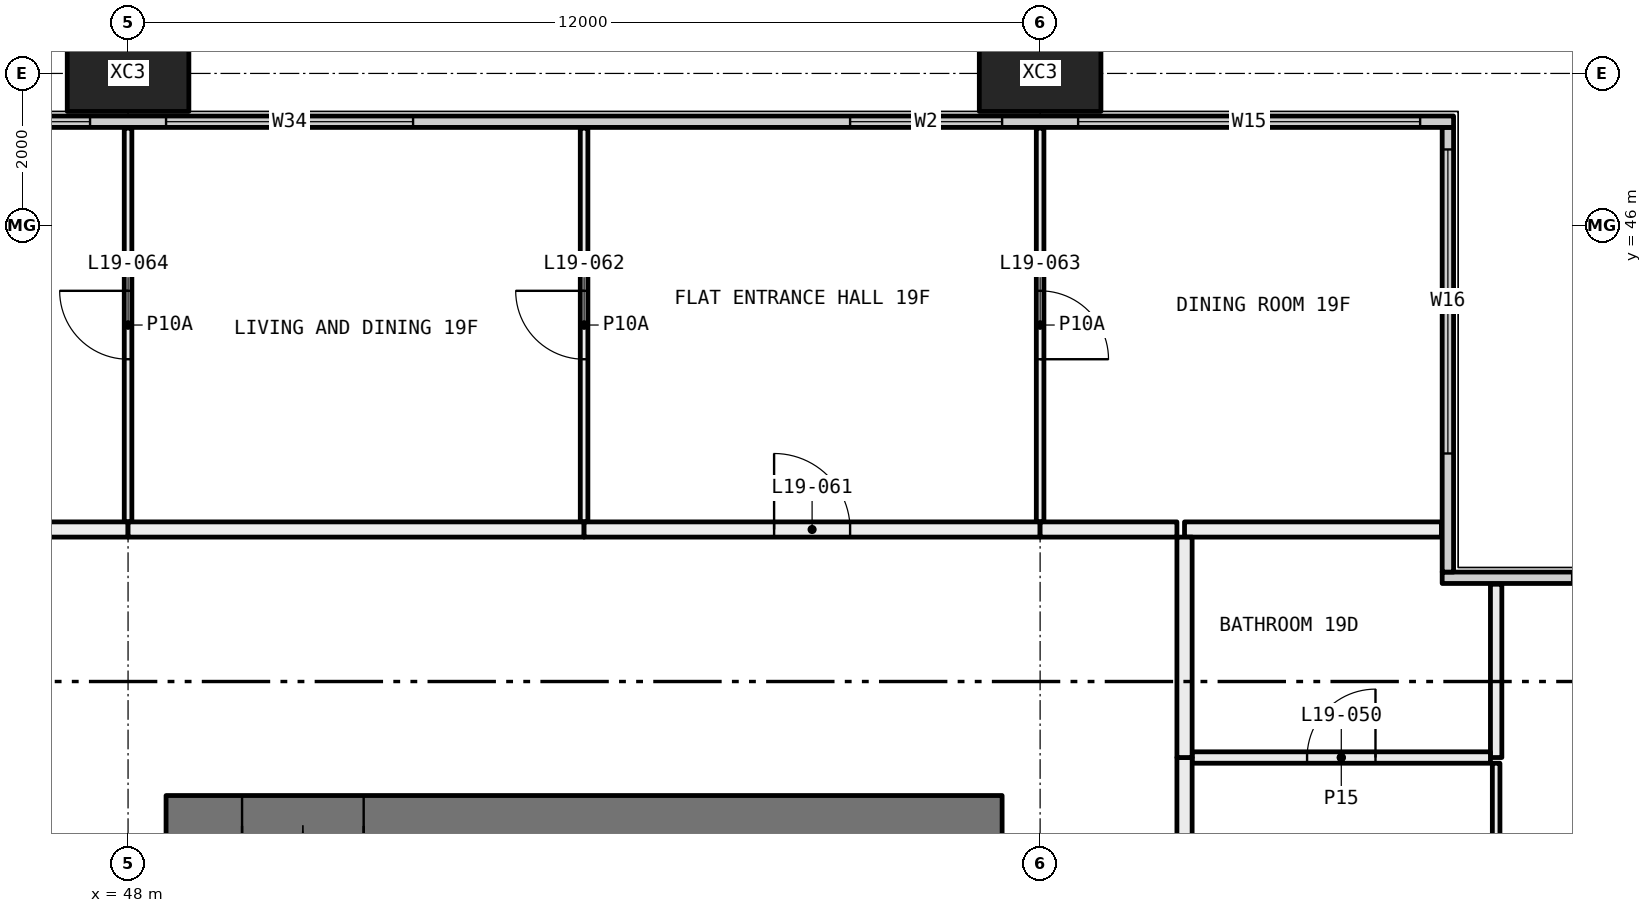
"""IFC4 building model, lengths in metres.
Left out: names, types, materials, properties, quantities, classifications, styles, units other than length and angle.
Written with IfcOpenShell. Run it as: python <this file> out.ifc"""

import sys

from ifc_helpers import new_model, si_unit, direction, frame, frame_2d, origin, origin_2d, place, context, subcontext, project, spatial, rectangle, hollow_rectangle, extrude, element, fill, save


model = new_model("IFC4")
c1 = context("Model", 3, precision=1e-05, world=origin(), true_north=direction((0.0, 1.0)))
c2 = subcontext(c1, "Body", "Model", "MODEL_VIEW")
j1 = project(units=[si_unit("LENGTHUNIT", "METRE"), si_unit("PLANEANGLEUNIT", "RADIAN")], contexts=[c1])
p1 = place(None, origin())
s1 = spatial("IfcSite", under=j1, at=p1, CompositionType="ELEMENT")
p2 = place(p1, origin())
s2 = spatial("IfcBuilding", under=s1, at=p2, CompositionType="ELEMENT")
p3 = place(p2, frame((0.0, 0.0, 78.3)))
s3 = spatial("IfcBuildingStorey", under=s2, at=p3, CompositionType="ELEMENT", Elevation=78.3)
for number, where, z_axis, x_axis in (
    (1, (48.0, 48.0, -0.4), (0.0, 0.0, 1.0), (1.0, 0.0, 0.0)),
    (2, (60.0, 48.0, -0.4), (0.0, 0.0, 1.0), (1.0, 0.0, 0.0)),
):
    element("IfcColumn", number, at=place(p3, frame(where, z_axis=z_axis, x_axis=x_axis)), inside=s3, PredefinedType="COLUMN", context=c2, shape_type="SweptSolid", body=[
        extrude(hollow_rectangle(XDim=1.6, YDim=1.0, WallThickness=0.065, at=origin_2d()), origin(), (0.0, 0.0, 1.0), 3.45),
    ])
p4 = place(p3, frame((65.29, 41.365, 0.0), z_axis=(0.0, 0.0, 1.0), x_axis=(1.0, 0.0, 0.0)))
e3 = element("IfcWall", 3, at=p4, inside=s3, PredefinedType="ELEMENTEDWALL", context=c2, shape_type="SweptSolid", body=[
    extrude(rectangle(XDim=6.15, YDim=0.15, at=frame_2d((3.075, 0.0))), origin(), (0.0, 0.0, 1.0), 3.05),
])
p5 = place(p4, frame((1.71, 0.0, 0.45)))
e4 = element("IfcOpeningElement", 4, at=p5, cuts=e3, PredefinedType="OPENING", context=c2, shape_type="SweptSolid", body=[
    extrude(rectangle(XDim=4.0, YDim=2.55, at=frame_2d((2.0, 1.275))), frame((0.0, 0.085, 0.0), z_axis=(0.0, -1.0, 0.0), x_axis=(1.0, 0.0, 0.0)), (0.0, 0.0, 1.0), 0.17),
])
p6 = place(p3, frame((65.365, 41.44, 0.0), z_axis=(0.0, 0.0, 1.0), x_axis=(0.0, 1.0, 0.0)))
e5 = element("IfcWall", 5, at=p6, inside=s3, PredefinedType="ELEMENTEDWALL", context=c2, shape_type="SweptSolid", body=[
    extrude(rectangle(XDim=5.85, YDim=0.15, at=frame_2d((2.925, 0.0))), origin(), (0.0, 0.0, 1.0), 3.05),
])
p7 = place(p6, frame((1.56, 0.0, 0.45)))
e6 = element("IfcOpeningElement", 6, at=p7, cuts=e5, PredefinedType="OPENING", context=c2, shape_type="SweptSolid", body=[
    extrude(rectangle(XDim=4.0, YDim=2.55, at=frame_2d((2.0, 1.275))), frame((0.0, 0.085, 0.0), z_axis=(0.0, -1.0, 0.0), x_axis=(1.0, 0.0, 0.0)), (0.0, 0.0, 1.0), 0.17),
])
p8 = place(p3, frame((6.56, 47.365, 0.0), z_axis=(0.0, 0.0, 1.0), x_axis=(1.0, 0.0, 0.0)))
e7 = element("IfcWall", 7, at=p8, inside=s3, PredefinedType="ELEMENTEDWALL", context=c2, shape_type="SweptSolid", body=[
    extrude(rectangle(XDim=58.88, YDim=0.15, at=frame_2d((29.44, 0.0))), origin(), (0.0, 0.0, 1.0), 3.05),
])
p9 = place(p8, frame((0.44, 0.0, 0.45)))
e8 = element("IfcOpeningElement", 8, at=p9, cuts=e7, PredefinedType="OPENING", context=c2, shape_type="SweptSolid", body=[
    extrude(rectangle(XDim=4.5, YDim=2.55, at=frame_2d((2.25, 1.275))), frame((0.0, 0.085, 0.0), z_axis=(0.0, -1.0, 0.0), x_axis=(1.0, 0.0, 0.0)), (0.0, 0.0, 1.0), 0.17),
])
p10 = place(p8, frame((5.94, 0.0, 0.45)))
e9 = element("IfcOpeningElement", 9, at=p10, cuts=e7, PredefinedType="OPENING", context=c2, shape_type="SweptSolid", body=[
    extrude(rectangle(XDim=3.25, YDim=2.55, at=frame_2d((1.625, 1.275))), frame((0.0, 0.085, 0.0), z_axis=(0.0, -1.0, 0.0), x_axis=(1.0, 0.0, 0.0)), (0.0, 0.0, 1.0), 0.17),
])
p11 = place(p8, frame((13.69, 0.0, 0.45)))
e10 = element("IfcOpeningElement", 10, at=p11, cuts=e7, PredefinedType="OPENING", context=c2, shape_type="SweptSolid", body=[
    extrude(rectangle(XDim=3.25, YDim=2.55, at=frame_2d((1.625, 1.275))), frame((0.0, 0.085, 0.0), z_axis=(0.0, -1.0, 0.0), x_axis=(1.0, 0.0, 0.0)), (0.0, 0.0, 1.0), 0.17),
])
p12 = place(p8, frame((17.94, 0.0, 0.45)))
e11 = element("IfcOpeningElement", 11, at=p12, cuts=e7, PredefinedType="OPENING", context=c2, shape_type="SweptSolid", body=[
    extrude(rectangle(XDim=3.25, YDim=2.55, at=frame_2d((1.625, 1.275))), frame((0.0, 0.085, 0.0), z_axis=(0.0, -1.0, 0.0), x_axis=(1.0, 0.0, 0.0)), (0.0, 0.0, 1.0), 0.17),
])
p13 = place(p8, frame((26.94, 0.0, 0.45)))
e12 = element("IfcOpeningElement", 12, at=p13, cuts=e7, PredefinedType="OPENING", context=c2, shape_type="SweptSolid", body=[
    extrude(rectangle(XDim=2.0, YDim=2.55, at=frame_2d((1.0, 1.275))), frame((0.0, 0.085, 0.0), z_axis=(0.0, -1.0, 0.0), x_axis=(1.0, 0.0, 0.0)), (0.0, 0.0, 1.0), 0.17),
])
p14 = place(p8, frame((29.94, 0.0, 0.45)))
e13 = element("IfcOpeningElement", 13, at=p14, cuts=e7, PredefinedType="OPENING", context=c2, shape_type="SweptSolid", body=[
    extrude(rectangle(XDim=3.25, YDim=2.55, at=frame_2d((1.625, 1.275))), frame((0.0, 0.085, 0.0), z_axis=(0.0, -1.0, 0.0), x_axis=(1.0, 0.0, 0.0)), (0.0, 0.0, 1.0), 0.17),
])
p15 = place(p8, frame((37.69, 0.0, 0.45)))
e14 = element("IfcOpeningElement", 14, at=p15, cuts=e7, PredefinedType="OPENING", context=c2, shape_type="SweptSolid", body=[
    extrude(rectangle(XDim=3.25, YDim=2.55, at=frame_2d((1.625, 1.275))), frame((0.0, 0.085, 0.0), z_axis=(0.0, -1.0, 0.0), x_axis=(1.0, 0.0, 0.0)), (0.0, 0.0, 1.0), 0.17),
])
p16 = place(p8, frame((41.94, 0.0, 0.45)))
e15 = element("IfcOpeningElement", 15, at=p16, cuts=e7, PredefinedType="OPENING", context=c2, shape_type="SweptSolid", body=[
    extrude(rectangle(XDim=3.25, YDim=2.55, at=frame_2d((1.625, 1.275))), frame((0.0, 0.085, 0.0), z_axis=(0.0, -1.0, 0.0), x_axis=(1.0, 0.0, 0.0)), (0.0, 0.0, 1.0), 0.17),
])
p17 = place(p8, frame((50.94, 0.0, 0.45)))
e16 = element("IfcOpeningElement", 16, at=p17, cuts=e7, PredefinedType="OPENING", context=c2, shape_type="SweptSolid", body=[
    extrude(rectangle(XDim=2.0, YDim=2.55, at=frame_2d((1.0, 1.275))), frame((0.0, 0.085, 0.0), z_axis=(0.0, -1.0, 0.0), x_axis=(1.0, 0.0, 0.0)), (0.0, 0.0, 1.0), 0.17),
])
p18 = place(p8, frame((53.94, 0.0, 0.45)))
e17 = element("IfcOpeningElement", 17, at=p18, cuts=e7, PredefinedType="OPENING", context=c2, shape_type="SweptSolid", body=[
    extrude(rectangle(XDim=4.5, YDim=2.55, at=frame_2d((2.25, 1.275))), frame((0.0, 0.085, 0.0), z_axis=(0.0, -1.0, 0.0), x_axis=(1.0, 0.0, 0.0)), (0.0, 0.0, 1.0), 0.17),
])
p19 = place(p3, frame((66.0, 38.925, 0.0), z_axis=(0.0, 0.0, 1.0), x_axis=(0.0, -1.0, 0.0)))
e18 = element("IfcWall", 18, at=p19, inside=s3, PredefinedType="PARTITIONING", context=c2, shape_type="SweptSolid", body=[
    extrude(rectangle(XDim=2.875, YDim=0.1, at=frame_2d((1.438, 0.0))), origin(), (0.0, 0.0, 1.0), 2.45),
])
p20 = place(p3, frame((66.0, 41.28, 0.0), z_axis=(0.0, 0.0, 1.0), x_axis=(0.0, -1.0, 0.0)))
e19 = element("IfcWall", 19, at=p20, inside=s3, PredefinedType="PARTITIONING", context=c2, shape_type="SweptSolid", body=[
    extrude(rectangle(XDim=2.28, YDim=0.15, at=frame_2d((1.14, 0.0))), origin(), (0.0, 0.0, 1.0), 3.05),
])
p21 = place(p3, frame((65.925, 39.0, 0.0), z_axis=(0.0, 0.0, 1.0), x_axis=(-1.0, 0.0, 0.0)))
e20 = element("IfcWall", 20, at=p21, inside=s3, PredefinedType="PARTITIONING", context=c2, shape_type="SweptSolid", body=[
    extrude(rectangle(XDim=3.925, YDim=0.15, at=frame_2d((1.962, 0.0))), origin(), (0.0, 0.0, 1.0), 3.05),
])
p22 = place(p21, frame((1.512, 0.0, 0.0)))
e21 = element("IfcOpeningElement", 21, at=p22, cuts=e20, PredefinedType="OPENING", context=c2, shape_type="SweptSolid", body=[
    extrude(rectangle(XDim=0.9, YDim=2.1, at=frame_2d((0.45, 1.05))), frame((0.0, 0.085, 0.0), z_axis=(0.0, -1.0, 0.0), x_axis=(1.0, 0.0, 0.0)), (0.0, 0.0, 1.0), 0.17),
])
p23 = place(p3, frame((61.9, 39.0, 0.0), z_axis=(0.0, 0.0, 1.0), x_axis=(0.0, -1.0, 0.0)))
e22 = element("IfcWall", 22, at=p23, inside=s3, PredefinedType="PARTITIONING", context=c2, shape_type="SweptSolid", body=[
    extrude(rectangle(XDim=3.1, YDim=0.2, at=frame_2d((1.55, 0.0))), origin(), (0.0, 0.0, 1.0), 2.45),
])
p24 = place(p3, frame((65.28, 42.0, 0.0), z_axis=(0.0, 0.0, 1.0), x_axis=(-1.0, 0.0, 0.0)))
e23 = element("IfcWall", 23, at=p24, inside=s3, PredefinedType="PARTITIONING", context=c2, shape_type="SweptSolid", body=[
    extrude(rectangle(XDim=3.38, YDim=0.2, at=frame_2d((1.69, 0.0))), origin(), (0.0, 0.0, 1.0), 3.05),
])
p25 = place(p3, frame((61.9, 41.9, 0.0), z_axis=(0.0, 0.0, 1.0), x_axis=(0.0, -1.0, 0.0)))
e24 = element("IfcWall", 24, at=p25, inside=s3, PredefinedType="PARTITIONING", context=c2, shape_type="SweptSolid", body=[
    extrude(rectangle(XDim=2.9, YDim=0.2, at=frame_2d((1.45, 0.0))), origin(), (0.0, 0.0, 1.0), 3.05),
])
p26 = place(p3, frame((48.0, 42.1, 0.0), z_axis=(0.0, 0.0, 1.0), x_axis=(0.0, 1.0, 0.0)))
e25 = element("IfcWall", 25, at=p26, inside=s3, PredefinedType="PARTITIONING", context=c2, shape_type="SweptSolid", body=[
    extrude(rectangle(XDim=5.18, YDim=0.1, at=frame_2d((2.59, 0.0))), origin(), (0.0, 0.0, 1.0), 3.05),
])
p27 = place(p26, frame((2.14, 0.0, 0.0)))
e26 = element("IfcOpeningElement", 26, at=p27, cuts=e25, PredefinedType="OPENING", context=c2, shape_type="SweptSolid", body=[
    extrude(rectangle(XDim=0.9, YDim=2.1, at=frame_2d((0.45, 1.05))), frame((0.0, 0.06, 0.0), z_axis=(0.0, -1.0, 0.0), x_axis=(1.0, 0.0, 0.0)), (0.0, 0.0, 1.0), 0.12),
])
p28 = place(p3, frame((46.1, 42.0, 0.0), z_axis=(0.0, 0.0, 1.0), x_axis=(1.0, 0.0, 0.0)))
e27 = element("IfcWall", 27, at=p28, inside=s3, PredefinedType="PARTITIONING", context=c2, shape_type="SweptSolid", body=[
    extrude(rectangle(XDim=1.9, YDim=0.2, at=frame_2d((0.95, 0.0))), origin(), (0.0, 0.0, 1.0), 3.05),
])
p29 = place(p3, frame((54.0, 42.1, 0.0), z_axis=(0.0, 0.0, 1.0), x_axis=(0.0, 1.0, 0.0)))
e28 = element("IfcWall", 28, at=p29, inside=s3, PredefinedType="PARTITIONING", context=c2, shape_type="SweptSolid", body=[
    extrude(rectangle(XDim=5.18, YDim=0.1, at=frame_2d((2.59, 0.0))), origin(), (0.0, 0.0, 1.0), 3.05),
])
p30 = place(p29, frame((2.14, 0.0, 0.0)))
e29 = element("IfcOpeningElement", 29, at=p30, cuts=e28, PredefinedType="OPENING", context=c2, shape_type="SweptSolid", body=[
    extrude(rectangle(XDim=0.9, YDim=2.1, at=frame_2d((0.45, 1.05))), frame((0.0, 0.06, 0.0), z_axis=(0.0, -1.0, 0.0), x_axis=(1.0, 0.0, 0.0)), (0.0, 0.0, 1.0), 0.12),
])
p31 = place(p3, frame((48.0, 42.0, 0.0), z_axis=(0.0, 0.0, 1.0), x_axis=(1.0, 0.0, 0.0)))
e30 = element("IfcWall", 30, at=p31, inside=s3, PredefinedType="PARTITIONING", context=c2, shape_type="SweptSolid", body=[
    extrude(rectangle(XDim=6.0, YDim=0.2, at=frame_2d((3.0, 0.0))), origin(), (0.0, 0.0, 1.0), 3.05),
])
p32 = place(p3, frame((60.0, 42.1, 0.0), z_axis=(0.0, 0.0, 1.0), x_axis=(0.0, 1.0, 0.0)))
e31 = element("IfcWall", 31, at=p32, inside=s3, PredefinedType="PARTITIONING", context=c2, shape_type="SweptSolid", body=[
    extrude(rectangle(XDim=5.18, YDim=0.1, at=frame_2d((2.59, 0.0))), origin(), (0.0, 0.0, 1.0), 3.05),
])
p33 = place(p32, frame((2.14, 0.0, 0.0)))
e32 = element("IfcOpeningElement", 32, at=p33, cuts=e31, PredefinedType="OPENING", context=c2, shape_type="SweptSolid", body=[
    extrude(rectangle(XDim=0.9, YDim=2.1, at=frame_2d((0.45, 1.05))), frame((0.0, 0.06, 0.0), z_axis=(0.0, -1.0, 0.0), x_axis=(1.0, 0.0, 0.0)), (0.0, 0.0, 1.0), 0.12),
])
p34 = place(p3, frame((54.0, 42.0, 0.0), z_axis=(0.0, 0.0, 1.0), x_axis=(1.0, 0.0, 0.0)))
e33 = element("IfcWall", 33, at=p34, inside=s3, PredefinedType="PARTITIONING", context=c2, shape_type="SweptSolid", body=[
    extrude(rectangle(XDim=6.0, YDim=0.2, at=frame_2d((3.0, 0.0))), origin(), (0.0, 0.0, 1.0), 3.05),
])
p35 = place(p34, frame((2.5, 0.0, 0.0)))
e34 = element("IfcOpeningElement", 34, at=p35, cuts=e33, PredefinedType="OPENING", context=c2, shape_type="SweptSolid", body=[
    extrude(rectangle(XDim=1.0, YDim=2.1, at=frame_2d((0.5, 1.05))), frame((0.0, 0.11, 0.0), z_axis=(0.0, -1.0, 0.0), x_axis=(1.0, 0.0, 0.0)), (0.0, 0.0, 1.0), 0.22),
])
p36 = place(p3, frame((60.0, 42.0, 0.0), z_axis=(0.0, 0.0, 1.0), x_axis=(1.0, 0.0, 0.0)))
e35 = element("IfcWall", 35, at=p36, inside=s3, PredefinedType="PARTITIONING", context=c2, shape_type="SweptSolid", body=[
    extrude(rectangle(XDim=1.8, YDim=0.2, at=frame_2d((0.9, 0.0))), origin(), (0.0, 0.0, 1.0), 3.05),
])
p37 = place(p3, frame((59.5, 38.1, 0.0), z_axis=(0.0, 0.0, 1.0), x_axis=(-1.0, 0.0, 0.0)))
e36 = element("IfcWall", 36, at=p37, inside=s3, PredefinedType="SHEAR", context=c2, shape_type="SweptSolid", body=[
    extrude(rectangle(XDim=11.0, YDim=0.8, at=frame_2d((5.5, 0.0))), origin(), (0.0, 0.0, 1.0), 3.05),
])
p38 = place(p37, frame((8.4, 0.0, 0.0)))
e37 = element("IfcOpeningElement", 37, at=p38, cuts=e36, PredefinedType="OPENING", context=c2, shape_type="SweptSolid", body=[
    extrude(rectangle(XDim=1.6, YDim=2.1, at=frame_2d((0.8, 1.05))), frame((0.0, 0.41, 0.0), z_axis=(0.0, -1.0, 0.0), x_axis=(1.0, 0.0, 0.0)), (0.0, 0.0, 1.0), 0.82),
])
p39 = place(p7, origin())
e38 = element("IfcWindow", 38, at=p39, inside=s3, PartitioningType="SINGLE_PANEL", PredefinedType="WINDOW", context=c2, shape_type="SweptSolid", body=[
    extrude(rectangle(XDim=4.0, YDim=2.55, at=frame_2d((2.0, 1.275))), frame((0.0, 0.03, 0.0), z_axis=(0.0, -1.0, 0.0), x_axis=(1.0, 0.0, 0.0)), (0.0, 0.0, 1.0), 0.06),
])
fill(e6, e38)
p40 = place(p15, origin())
e39 = element("IfcWindow", 39, at=p40, inside=s3, PartitioningType="SINGLE_PANEL", PredefinedType="WINDOW", context=c2, shape_type="SweptSolid", body=[
    extrude(rectangle(XDim=3.25, YDim=2.55, at=frame_2d((1.625, 1.275))), frame((0.0, 0.03, 0.0), z_axis=(0.0, -1.0, 0.0), x_axis=(1.0, 0.0, 0.0)), (0.0, 0.0, 1.0), 0.06),
])
fill(e14, e39)
p41 = place(p16, origin())
e40 = element("IfcWindow", 40, at=p41, inside=s3, PartitioningType="SINGLE_PANEL", PredefinedType="WINDOW", context=c2, shape_type="SweptSolid", body=[
    extrude(rectangle(XDim=3.25, YDim=2.55, at=frame_2d((1.625, 1.275))), frame((0.0, 0.03, 0.0), z_axis=(0.0, -1.0, 0.0), x_axis=(1.0, 0.0, 0.0)), (0.0, 0.0, 1.0), 0.06),
])
fill(e15, e40)
p42 = place(p17, origin())
e41 = element("IfcWindow", 41, at=p42, inside=s3, PartitioningType="SINGLE_PANEL", PredefinedType="WINDOW", context=c2, shape_type="SweptSolid", body=[
    extrude(rectangle(XDim=2.0, YDim=2.55, at=frame_2d((1.0, 1.275))), frame((0.0, 0.03, 0.0), z_axis=(0.0, -1.0, 0.0), x_axis=(1.0, 0.0, 0.0)), (0.0, 0.0, 1.0), 0.06),
])
fill(e16, e41)
p43 = place(p18, origin())
e42 = element("IfcWindow", 42, at=p43, inside=s3, PartitioningType="SINGLE_PANEL", PredefinedType="WINDOW", context=c2, shape_type="SweptSolid", body=[
    extrude(rectangle(XDim=4.5, YDim=2.55, at=frame_2d((2.25, 1.275))), frame((0.0, 0.03, 0.0), z_axis=(0.0, -1.0, 0.0), x_axis=(1.0, 0.0, 0.0)), (0.0, 0.0, 1.0), 0.06),
])
fill(e17, e42)
p44 = place(p22, frame((0.9, 0.0, 0.0), x_axis=(-1.0, 0.0, 0.0)))
e43 = element("IfcDoor", 43, at=p44, inside=s3, OperationType="SINGLE_SWING_LEFT", PredefinedType="DOOR", context=c2, shape_type="SweptSolid", body=[
    extrude(rectangle(XDim=0.9, YDim=2.1, at=frame_2d((0.45, 1.05))), frame((0.0, 0.025, 0.0), z_axis=(0.0, -1.0, 0.0), x_axis=(1.0, 0.0, 0.0)), (0.0, 0.0, 1.0), 0.05),
])
fill(e21, e43)
p45 = place(p35, origin())
e44 = element("IfcDoor", 44, at=p45, inside=s3, OperationType="SINGLE_SWING_RIGHT", PredefinedType="DOOR", context=c2, shape_type="SweptSolid", body=[
    extrude(rectangle(XDim=1.0, YDim=2.1, at=frame_2d((0.5, 1.05))), frame((0.0, 0.025, 0.0), z_axis=(0.0, -1.0, 0.0), x_axis=(1.0, 0.0, 0.0)), (0.0, 0.0, 1.0), 0.05),
])
fill(e34, e44)
p46 = place(p30, origin())
e45 = element("IfcDoor", 45, at=p46, inside=s3, OperationType="SINGLE_SWING_LEFT", PredefinedType="DOOR", context=c2, shape_type="SweptSolid", body=[
    extrude(rectangle(XDim=0.9, YDim=2.1, at=frame_2d((0.45, 1.05))), frame((0.0, 0.025, 0.0), z_axis=(0.0, -1.0, 0.0), x_axis=(1.0, 0.0, 0.0)), (0.0, 0.0, 1.0), 0.05),
])
fill(e29, e45)
p47 = place(p33, frame((0.9, 0.0, 0.0), x_axis=(-1.0, 0.0, 0.0)))
e46 = element("IfcDoor", 46, at=p47, inside=s3, OperationType="SINGLE_SWING_LEFT", PredefinedType="DOOR", context=c2, shape_type="SweptSolid", body=[
    extrude(rectangle(XDim=0.9, YDim=2.1, at=frame_2d((0.45, 1.05))), frame((0.0, 0.025, 0.0), z_axis=(0.0, -1.0, 0.0), x_axis=(1.0, 0.0, 0.0)), (0.0, 0.0, 1.0), 0.05),
])
fill(e32, e46)
p48 = place(p27, origin())
e47 = element("IfcDoor", 47, at=p48, inside=s3, OperationType="SINGLE_SWING_LEFT", PredefinedType="DOOR", context=c2, shape_type="SweptSolid", body=[
    extrude(rectangle(XDim=0.9, YDim=2.1, at=frame_2d((0.45, 1.05))), frame((0.0, 0.025, 0.0), z_axis=(0.0, -1.0, 0.0), x_axis=(1.0, 0.0, 0.0)), (0.0, 0.0, 1.0), 0.05),
])
fill(e26, e47)
p49 = place(p38, origin())
e48 = element("IfcDoor", 48, at=p49, inside=s3, OperationType="DOUBLE_DOOR_SINGLE_SWING", PredefinedType="DOOR", context=c2, shape_type="SweptSolid", body=[
    extrude(rectangle(XDim=1.6, YDim=2.1, at=frame_2d((0.8, 1.05))), frame((0.0, 0.025, 0.0), z_axis=(0.0, -1.0, 0.0), x_axis=(1.0, 0.0, 0.0)), (0.0, 0.0, 1.0), 0.05),
])
fill(e37, e48)
save(model, sys.argv[1])
